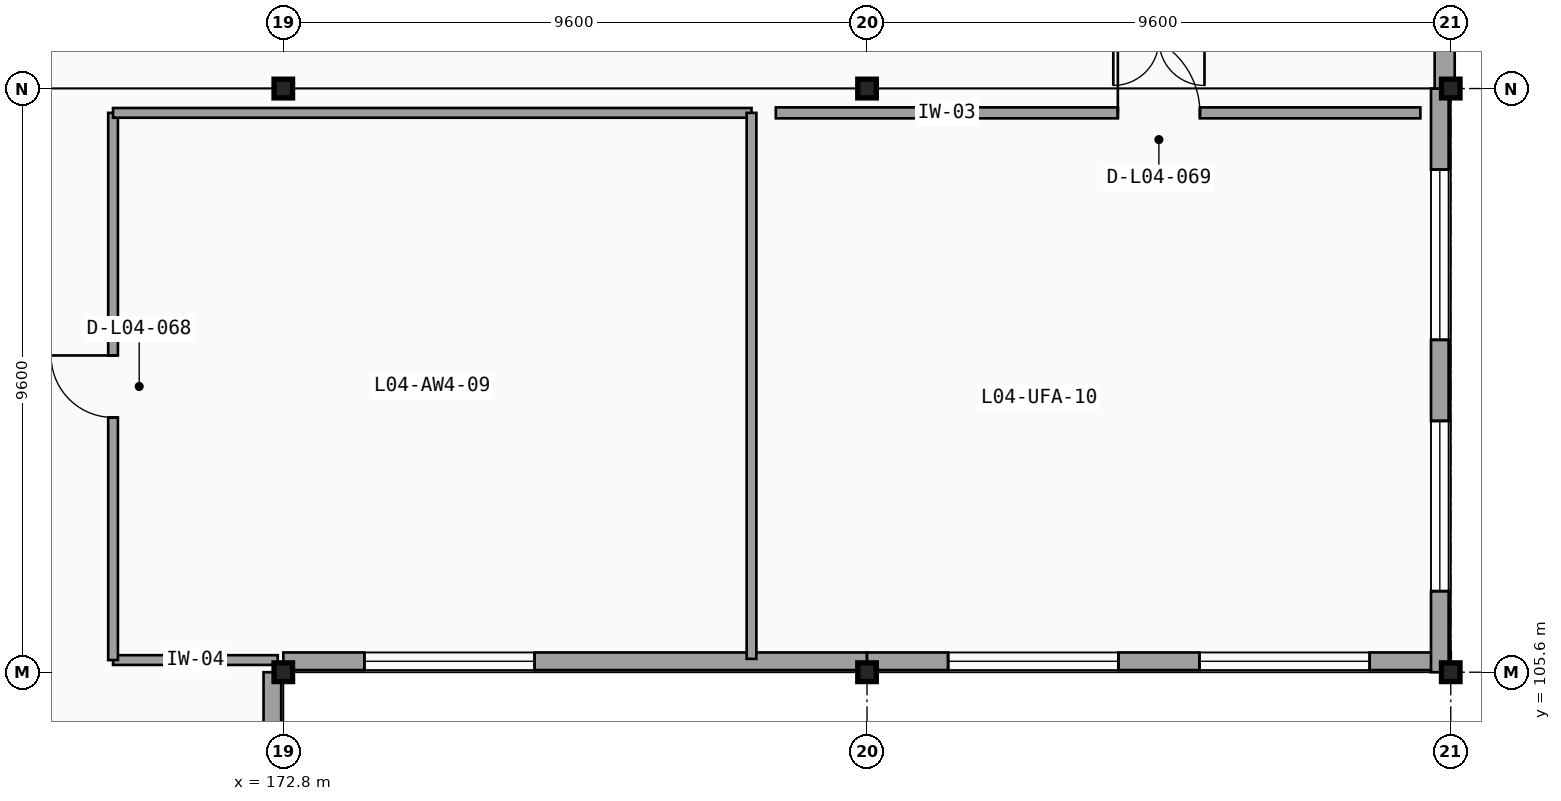
"""IFC4 building model, lengths in metres.
Left out: names, types, materials, properties, quantities, classifications, styles, units other than length and angle.
Written with IfcOpenShell. Run it as: python <this file> out.ifc"""

import sys

from ifc_helpers import new_model, si_unit, direction, frame, frame_2d, origin, origin_2d, place, context, subcontext, project, spatial, rectangle, i_section, extrude, element, fill, save


model = new_model("IFC4")
c1 = context("Model", 3, precision=1e-05, world=origin(), true_north=direction((0.0, 1.0)))
c2 = subcontext(c1, "Body", "Model", "MODEL_VIEW")
j1 = project(units=[si_unit("LENGTHUNIT", "METRE"), si_unit("PLANEANGLEUNIT", "RADIAN")], contexts=[c1])
p1 = place(None, origin())
s1 = spatial("IfcSite", under=j1, at=p1, CompositionType="ELEMENT")
p2 = place(p1, origin())
s2 = spatial("IfcBuilding", under=s1, at=p2, CompositionType="ELEMENT")
p3 = place(p2, frame((0.0, 0.0, 18.6)))
s3 = spatial("IfcBuildingStorey", under=s2, at=p3, CompositionType="ELEMENT", Elevation=18.6)
for number, where, z_axis, x_axis in (
    (1, (172.8, 105.6, 0.0), (0.0, 0.0, 1.0), (1.0, 0.0, 0.0)),
    (2, (172.8, 115.2, 0.0), (0.0, 0.0, 1.0), (1.0, 0.0, 0.0)),
    (3, (182.4, 105.6, 0.0), (0.0, 0.0, 1.0), (1.0, 0.0, 0.0)),
    (4, (182.4, 115.2, 0.0), (0.0, 0.0, 1.0), (1.0, 0.0, 0.0)),
    (5, (192.0, 105.6, 0.0), (0.0, 0.0, 1.0), (1.0, 0.0, 0.0)),
    (6, (192.0, 115.2, 0.0), (0.0, 0.0, 1.0), (1.0, 0.0, 0.0)),
):
    element("IfcColumn", number, at=place(p3, frame(where, z_axis=z_axis, x_axis=x_axis)), inside=s3, PredefinedType="COLUMN", context=c2, shape_type="SweptSolid", body=[
        extrude(i_section(OverallWidth=0.305, OverallDepth=0.308, WebThickness=0.01, FlangeThickness=0.015, FilletRadius=0.013, at=origin_2d()), origin(), (0.0, 0.0, 1.0), 4.5),
    ])
p4 = place(p3, frame((172.62, 96.0, 0.0), z_axis=(0.0, 0.0, 1.0), x_axis=(0.0, 1.0, 0.0)))
e7 = element("IfcWall", 7, at=p4, inside=s3, PredefinedType="SOLIDWALL", context=c2, shape_type="SweptSolid", body=[
    extrude(rectangle(XDim=9.6, YDim=0.29, at=frame_2d((4.8, 0.0))), origin(), (0.0, 0.0, 1.0), 3.562),
])
p5 = place(p4, frame((4.133, 0.0, 0.95), z_axis=(0.0, 0.0, 1.0), x_axis=(-1.0, 0.0, 0.0)))
e8 = element("IfcOpeningElement", 8, at=p5, cuts=e7, PredefinedType="OPENING", context=c2, shape_type="SweptSolid", body=[
    extrude(rectangle(XDim=2.8, YDim=1.9, at=frame_2d((1.4, 0.95))), frame((0.0, 0.155, 0.0), z_axis=(0.0, -1.0, 0.0), x_axis=(1.0, 0.0, 0.0)), (0.0, 0.0, 1.0), 0.31),
])
p6 = place(p4, frame((8.267, 0.0, 0.95), z_axis=(0.0, 0.0, 1.0), x_axis=(-1.0, 0.0, 0.0)))
e9 = element("IfcOpeningElement", 9, at=p6, cuts=e7, PredefinedType="OPENING", context=c2, shape_type="SweptSolid", body=[
    extrude(rectangle(XDim=2.8, YDim=1.9, at=frame_2d((1.4, 0.95))), frame((0.0, 0.155, 0.0), z_axis=(0.0, -1.0, 0.0), x_axis=(1.0, 0.0, 0.0)), (0.0, 0.0, 1.0), 0.31),
])
p7 = place(p3, frame((172.8, 105.78, 0.0), z_axis=(0.0, 0.0, 1.0), x_axis=(1.0, 0.0, 0.0)))
e10 = element("IfcWall", 10, at=p7, inside=s3, PredefinedType="SOLIDWALL", context=c2, shape_type="SweptSolid", body=[
    extrude(rectangle(XDim=9.6, YDim=0.29, at=frame_2d((4.8, 0.0))), origin(), (0.0, 0.0, 1.0), 3.562),
])
p8 = place(p7, frame((4.133, 0.0, 0.95), z_axis=(0.0, 0.0, 1.0), x_axis=(-1.0, 0.0, 0.0)))
e11 = element("IfcOpeningElement", 11, at=p8, cuts=e10, PredefinedType="OPENING", context=c2, shape_type="SweptSolid", body=[
    extrude(rectangle(XDim=2.8, YDim=1.9, at=frame_2d((1.4, 0.95))), frame((0.0, 0.155, 0.0), z_axis=(0.0, -1.0, 0.0), x_axis=(1.0, 0.0, 0.0)), (0.0, 0.0, 1.0), 0.31),
])
p9 = place(p3, frame((182.4, 105.78, 0.0), z_axis=(0.0, 0.0, 1.0), x_axis=(1.0, 0.0, 0.0)))
e12 = element("IfcWall", 12, at=p9, inside=s3, PredefinedType="SOLIDWALL", context=c2, shape_type="SweptSolid", body=[
    extrude(rectangle(XDim=9.6, YDim=0.29, at=frame_2d((4.8, 0.0))), origin(), (0.0, 0.0, 1.0), 3.313),
])
p10 = place(p9, frame((4.133, 0.0, 0.95), z_axis=(0.0, 0.0, 1.0), x_axis=(-1.0, 0.0, 0.0)))
e13 = element("IfcOpeningElement", 13, at=p10, cuts=e12, PredefinedType="OPENING", context=c2, shape_type="SweptSolid", body=[
    extrude(rectangle(XDim=2.8, YDim=1.9, at=frame_2d((1.4, 0.95))), frame((0.0, 0.155, 0.0), z_axis=(0.0, -1.0, 0.0), x_axis=(1.0, 0.0, 0.0)), (0.0, 0.0, 1.0), 0.31),
])
p11 = place(p9, frame((8.267, 0.0, 0.95), z_axis=(0.0, 0.0, 1.0), x_axis=(-1.0, 0.0, 0.0)))
e14 = element("IfcOpeningElement", 14, at=p11, cuts=e12, PredefinedType="OPENING", context=c2, shape_type="SweptSolid", body=[
    extrude(rectangle(XDim=2.8, YDim=1.9, at=frame_2d((1.4, 0.95))), frame((0.0, 0.155, 0.0), z_axis=(0.0, -1.0, 0.0), x_axis=(1.0, 0.0, 0.0)), (0.0, 0.0, 1.0), 0.31),
])
p12 = place(p3, frame((191.82, 105.6, 0.0), z_axis=(0.0, 0.0, 1.0), x_axis=(0.0, 1.0, 0.0)))
e15 = element("IfcWall", 15, at=p12, inside=s3, PredefinedType="SOLIDWALL", context=c2, shape_type="SweptSolid", body=[
    extrude(rectangle(XDim=9.6, YDim=0.29, at=frame_2d((4.8, 0.0))), origin(), (0.0, 0.0, 1.0), 3.313),
])
p13 = place(p12, frame((4.133, 0.0, 0.95), z_axis=(0.0, 0.0, 1.0), x_axis=(-1.0, 0.0, 0.0)))
e16 = element("IfcOpeningElement", 16, at=p13, cuts=e15, PredefinedType="OPENING", context=c2, shape_type="SweptSolid", body=[
    extrude(rectangle(XDim=2.8, YDim=1.9, at=frame_2d((1.4, 0.95))), frame((0.0, 0.155, 0.0), z_axis=(0.0, -1.0, 0.0), x_axis=(1.0, 0.0, 0.0)), (0.0, 0.0, 1.0), 0.31),
])
p14 = place(p12, frame((8.267, 0.0, 0.95), z_axis=(0.0, 0.0, 1.0), x_axis=(-1.0, 0.0, 0.0)))
e17 = element("IfcOpeningElement", 17, at=p14, cuts=e15, PredefinedType="OPENING", context=c2, shape_type="SweptSolid", body=[
    extrude(rectangle(XDim=2.8, YDim=1.9, at=frame_2d((1.4, 0.95))), frame((0.0, 0.155, 0.0), z_axis=(0.0, -1.0, 0.0), x_axis=(1.0, 0.0, 0.0)), (0.0, 0.0, 1.0), 0.31),
])
p15 = place(p3, frame((191.9, 115.2, 0.0), z_axis=(0.0, 0.0, 1.0), x_axis=(0.0, 1.0, 0.0)))
e18 = element("IfcWall", 18, at=p15, inside=s3, PredefinedType="SOLIDWALL", context=c2, shape_type="SweptSolid", body=[
    extrude(rectangle(XDim=9.6, YDim=0.33, at=frame_2d((4.8, 0.0))), origin(), (0.0, 0.0, 1.0), 3.313),
])
p16 = place(p3, frame((172.709, 105.8, 0.0), z_axis=(0.0, 0.0, 1.0), x_axis=(-1.0, 0.0, 0.0)))
e19 = element("IfcWall", 19, at=p16, inside=s3, PredefinedType="PARTITIONING", context=c2, shape_type="SweptSolid", body=[
    extrude(rectangle(XDim=2.709, YDim=0.16, at=frame_2d((1.354, 0.0))), origin(), (0.0, 0.0, 1.0), 3.562),
])
p17 = place(p3, frame((170.0, 105.8, 0.0), z_axis=(0.0, 0.0, 1.0), x_axis=(0.0, 1.0, 0.0)))
e20 = element("IfcWall", 20, at=p17, inside=s3, PredefinedType="PARTITIONING", context=c2, shape_type="SweptSolid", body=[
    extrude(rectangle(XDim=9.0, YDim=0.16, at=frame_2d((4.5, 0.0))), origin(), (0.0, 0.0, 1.0), 3.836),
])
p18 = place(p17, frame((3.99, 0.0, 0.0), z_axis=(0.0, 0.0, 1.0), x_axis=(1.0, 0.0, 0.0)))
e21 = element("IfcOpeningElement", 21, at=p18, cuts=e20, PredefinedType="OPENING", context=c2, shape_type="SweptSolid", body=[
    extrude(rectangle(XDim=1.02, YDim=2.15, at=frame_2d((0.51, 1.075))), frame((0.0, 0.09, 0.0), z_axis=(0.0, -1.0, 0.0), x_axis=(1.0, 0.0, 0.0)), (0.0, 0.0, 1.0), 0.18),
])
p19 = place(p3, frame((170.0, 114.8, 0.0), z_axis=(0.0, 0.0, 1.0), x_axis=(1.0, 0.0, 0.0)))
e22 = element("IfcWall", 22, at=p19, inside=s3, PredefinedType="PARTITIONING", context=c2, shape_type="SweptSolid", body=[
    extrude(rectangle(XDim=10.5, YDim=0.16, at=frame_2d((5.25, 0.0))), origin(), (0.0, 0.0, 1.0), 3.638),
])
p20 = place(p3, frame((180.5, 114.8, 0.0), z_axis=(0.0, 0.0, 1.0), x_axis=(0.0, -1.0, 0.0)))
e23 = element("IfcWall", 23, at=p20, inside=s3, PredefinedType="PARTITIONING", context=c2, shape_type="SweptSolid", body=[
    extrude(rectangle(XDim=8.98, YDim=0.16, at=frame_2d((4.49, 0.0))), origin(), (0.0, 0.0, 1.0), 3.836),
])
p21 = place(p3, frame((180.9, 114.8, 0.0), z_axis=(0.0, 0.0, 1.0), x_axis=(1.0, 0.0, 0.0)))
e24 = element("IfcWall", 24, at=p21, inside=s3, PredefinedType="PARTITIONING", context=c2, shape_type="SweptSolid", body=[
    extrude(rectangle(XDim=10.6, YDim=0.18, at=frame_2d((5.3, 0.0))), origin(), (0.0, 0.0, 1.0), 3.638),
])
p22 = place(p21, frame((5.625, 0.0, 0.0), z_axis=(0.0, 0.0, 1.0), x_axis=(1.0, 0.0, 0.0)))
e25 = element("IfcOpeningElement", 25, at=p22, cuts=e24, PredefinedType="OPENING", context=c2, shape_type="SweptSolid", body=[
    extrude(rectangle(XDim=1.35, YDim=2.25, at=frame_2d((0.675, 1.125))), frame((0.0, 0.1, 0.0), z_axis=(0.0, -1.0, 0.0), x_axis=(1.0, 0.0, 0.0)), (0.0, 0.0, 1.0), 0.2),
])
p23 = place(p8, origin())
e26 = element("IfcWindow", 26, at=p23, inside=s3, PartitioningType="SINGLE_PANEL", PredefinedType="WINDOW", context=c2, shape_type="SweptSolid", body=[
    extrude(rectangle(XDim=2.8, YDim=1.9, at=frame_2d((1.4, 0.95))), frame((0.0, 0.03, 0.0), z_axis=(0.0, -1.0, 0.0), x_axis=(1.0, 0.0, 0.0)), (0.0, 0.0, 1.0), 0.06),
])
fill(e11, e26)
p24 = place(p10, origin())
e27 = element("IfcWindow", 27, at=p24, inside=s3, PartitioningType="SINGLE_PANEL", PredefinedType="WINDOW", context=c2, shape_type="SweptSolid", body=[
    extrude(rectangle(XDim=2.8, YDim=1.9, at=frame_2d((1.4, 0.95))), frame((0.0, 0.03, 0.0), z_axis=(0.0, -1.0, 0.0), x_axis=(1.0, 0.0, 0.0)), (0.0, 0.0, 1.0), 0.06),
])
fill(e13, e27)
p25 = place(p11, origin())
e28 = element("IfcWindow", 28, at=p25, inside=s3, PartitioningType="SINGLE_PANEL", PredefinedType="WINDOW", context=c2, shape_type="SweptSolid", body=[
    extrude(rectangle(XDim=2.8, YDim=1.9, at=frame_2d((1.4, 0.95))), frame((0.0, 0.03, 0.0), z_axis=(0.0, -1.0, 0.0), x_axis=(1.0, 0.0, 0.0)), (0.0, 0.0, 1.0), 0.06),
])
fill(e14, e28)
p26 = place(p13, origin())
e29 = element("IfcWindow", 29, at=p26, inside=s3, PartitioningType="SINGLE_PANEL", PredefinedType="WINDOW", context=c2, shape_type="SweptSolid", body=[
    extrude(rectangle(XDim=2.8, YDim=1.9, at=frame_2d((1.4, 0.95))), frame((0.0, 0.03, 0.0), z_axis=(0.0, -1.0, 0.0), x_axis=(1.0, 0.0, 0.0)), (0.0, 0.0, 1.0), 0.06),
])
fill(e16, e29)
p27 = place(p14, origin())
e30 = element("IfcWindow", 30, at=p27, inside=s3, PartitioningType="SINGLE_PANEL", PredefinedType="WINDOW", context=c2, shape_type="SweptSolid", body=[
    extrude(rectangle(XDim=2.8, YDim=1.9, at=frame_2d((1.4, 0.95))), frame((0.0, 0.03, 0.0), z_axis=(0.0, -1.0, 0.0), x_axis=(1.0, 0.0, 0.0)), (0.0, 0.0, 1.0), 0.06),
])
fill(e17, e30)
p28 = place(p18, origin())
e31 = element("IfcDoor", 31, at=p28, inside=s3, OperationType="SINGLE_SWING_RIGHT", PredefinedType="DOOR", context=c2, shape_type="SweptSolid", body=[
    extrude(rectangle(XDim=1.02, YDim=2.15, at=frame_2d((0.51, 1.075))), frame((0.0, 0.025, 0.0), z_axis=(0.0, -1.0, 0.0), x_axis=(1.0, 0.0, 0.0)), (0.0, 0.0, 1.0), 0.05),
])
fill(e21, e31)
p29 = place(p22, origin())
e32 = element("IfcDoor", 32, at=p29, inside=s3, OperationType="SINGLE_SWING_LEFT", PredefinedType="DOOR", context=c2, shape_type="SweptSolid", body=[
    extrude(rectangle(XDim=1.35, YDim=2.25, at=frame_2d((0.675, 1.125))), frame((0.0, 0.025, 0.0), z_axis=(0.0, -1.0, 0.0), x_axis=(1.0, 0.0, 0.0)), (0.0, 0.0, 1.0), 0.05),
])
fill(e25, e32)
save(model, sys.argv[1])
